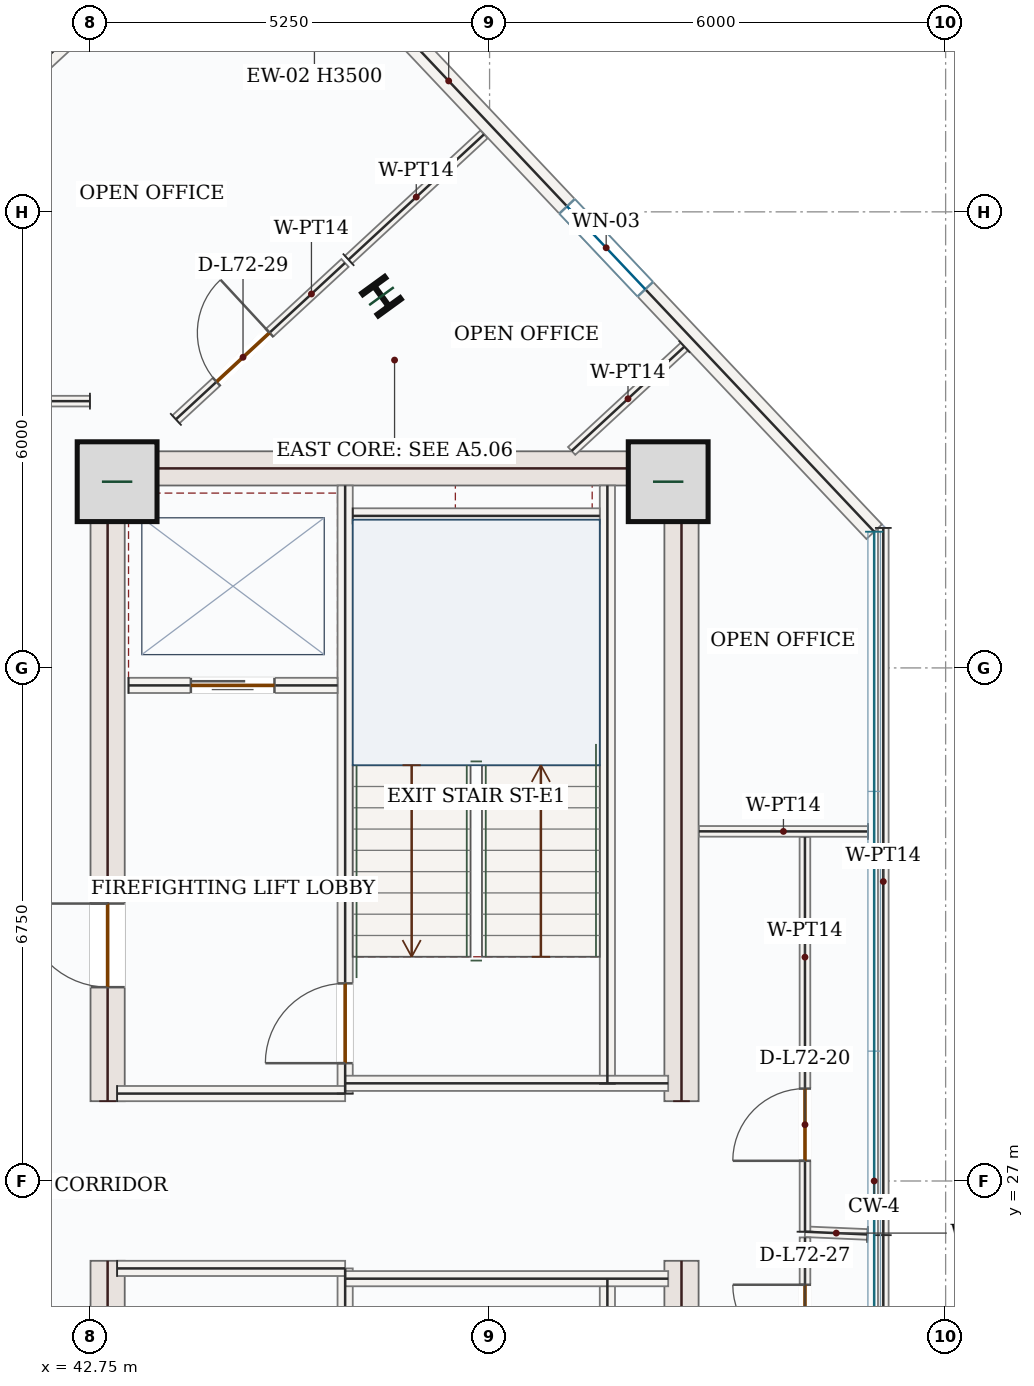
"""IFC4 building model, lengths in metres.
Left out: names, types, materials, properties, quantities, classifications, styles, units other than length and angle.
Written with IfcOpenShell. Run it as: python <this file> out.ifc"""

import sys

from ifc_helpers import new_model, si_unit, direction, frame, frame_2d, origin, origin_2d, place, context, subcontext, project, spatial, rectangle, i_section, extrude, source, transform, mapped, element, fill, save


model = new_model("IFC4")
c1 = context("Model", 3, precision=1e-05, world=origin(), true_north=direction((0.0, 1.0)))
c2 = subcontext(c1, "Body", "Model", "MODEL_VIEW")
j1 = project(units=[si_unit("LENGTHUNIT", "METRE"), si_unit("PLANEANGLEUNIT", "RADIAN")], contexts=[c1])
p1 = place(None, origin())
s1 = spatial("IfcSite", under=j1, at=p1, CompositionType="ELEMENT")
p2 = place(p1, origin())
s2 = spatial("IfcBuilding", under=s1, at=p2, CompositionType="ELEMENT")
p3 = place(p2, frame((0.0, 0.0, 299.1)))
s3 = spatial("IfcBuildingStorey", under=s2, at=p3, CompositionType="ELEMENT", Elevation=299.1)
p4 = place(p3, frame((42.975, 17.4, 0.0), z_axis=(0.0, 0.0, 1.0), x_axis=(0.0, 1.0, 0.0)))
e1 = element("IfcWall", 1, at=p4, inside=s3, PredefinedType="SHEAR", context=c2, shape_type="SweptSolid", body=[
    extrude(rectangle(XDim=8.55, YDim=0.45, at=frame_2d((4.275, 0.0))), origin(), (0.0, 0.0, 1.0), 3.5),
])
p5 = place(p4, frame((6.65, 0.0, 0.0)))
e2 = element("IfcOpeningElement", 2, at=p5, cuts=e1, PredefinedType="OPENING", context=c2, shape_type="SweptSolid", body=[
    extrude(rectangle(XDim=1.1, YDim=2.2, at=frame_2d((0.55, 1.1))), frame((0.0, 0.235, 0.0), z_axis=(0.0, -1.0, 0.0), x_axis=(1.0, 0.0, 0.0)), (0.0, 0.0, 1.0), 0.47),
])
p6 = place(p4, frame((1.75, 0.0, 0.0)))
e3 = element("IfcOpeningElement", 3, at=p6, cuts=e1, PredefinedType="OPENING", context=c2, shape_type="SweptSolid", body=[
    extrude(rectangle(XDim=1.3, YDim=2.2, at=frame_2d((0.65, 1.1))), frame((0.0, 0.235, 0.0), z_axis=(0.0, -1.0, 0.0), x_axis=(1.0, 0.0, 0.0)), (0.0, 0.0, 1.0), 0.47),
])
p7 = place(p4, frame((4.55, 0.0, 0.0)))
e4 = element("IfcOpeningElement", 4, at=p7, cuts=e1, PredefinedType="OPENING", context=c2, shape_type="SweptSolid", body=[
    extrude(rectangle(XDim=0.88, YDim=2.1, at=frame_2d((0.44, 1.05))), frame((0.0, 0.235, 0.0), z_axis=(0.0, -1.0, 0.0), x_axis=(1.0, 0.0, 0.0)), (0.0, 0.0, 1.0), 0.47),
])
p8 = place(p3, frame((42.975, 28.05, 0.0), z_axis=(0.0, 0.0, 1.0), x_axis=(0.0, 1.0, 0.0)))
e5 = element("IfcWall", 5, at=p8, inside=s3, PredefinedType="SHEAR", context=c2, shape_type="SweptSolid", body=[
    extrude(rectangle(XDim=8.55, YDim=0.45, at=frame_2d((4.275, 0.0))), origin(), (0.0, 0.0, 1.0), 3.5),
])
p9 = place(p8, frame((1.5, 0.0, 0.0)))
e6 = element("IfcOpeningElement", 6, at=p9, cuts=e5, PredefinedType="OPENING", context=c2, shape_type="SweptSolid", body=[
    extrude(rectangle(XDim=1.1, YDim=2.2, at=frame_2d((0.55, 1.1))), frame((0.0, 0.235, 0.0), z_axis=(0.0, -1.0, 0.0), x_axis=(1.0, 0.0, 0.0)), (0.0, 0.0, 1.0), 0.47),
])
m1 = source(origin(), c2, "Body", "SweptSolid", [
    extrude(rectangle(XDim=8.55, YDim=0.45, at=frame_2d((4.275, 0.0))), origin(), (0.0, 0.0, 1.0), 3.5),
])
for number, where, z_axis, x_axis in (
    (7, (50.525, 17.4, 0.0), (0.0, 0.0, 1.0), (0.0, 1.0, 0.0)),
    (8, (50.525, 28.05, 0.0), (0.0, 0.0, 1.0), (0.0, 1.0, 0.0)),
):
    element("IfcWall", number, at=place(p3, frame(where, z_axis=z_axis, x_axis=x_axis)), inside=s3, PredefinedType="SHEAR", context=c2, shape_type="MappedRepresentation", body=[
        mapped(m1, transform((0.0, 0.0, 0.0), x_axis=(1.0, 0.0, 0.0), y_axis=(0.0, 1.0, 0.0), z_axis=(0.0, 0.0, 1.0), scale=1.0)),
    ])
m2 = source(origin(), c2, "Body", "SweptSolid", [
    extrude(rectangle(XDim=7.1, YDim=0.45, at=frame_2d((3.55, 0.0))), origin(), (0.0, 0.0, 1.0), 3.5),
])
p10 = place(p3, frame((43.2, 36.375, 0.0), z_axis=(0.0, 0.0, 1.0), x_axis=(1.0, 0.0, 0.0)))
e9 = element("IfcWall", 9, at=p10, inside=s3, PredefinedType="SHEAR", context=c2, shape_type="MappedRepresentation", body=[
    mapped(m2, transform((0.0, 0.0, 0.0), x_axis=(1.0, 0.0, 0.0), y_axis=(0.0, 1.0, 0.0), z_axis=(0.0, 0.0, 1.0), scale=1.0)),
])
m3 = source(origin(), c2, "Body", "SweptSolid", [
    extrude(rectangle(XDim=1.05, YDim=1.05, at=origin_2d()), origin(), (0.0, 0.0, 1.0), 3.75),
])
for number, where, z_axis, x_axis in (
    (10, (43.1, 36.2, 0.0), (0.0, 0.0, 1.0), (1.0, 0.0, 0.0)),
    (11, (50.35, 36.2, 0.0), (0.0, 0.0, 1.0), (1.0, 0.0, 0.0)),
):
    element("IfcColumn", number, at=place(p3, frame(where, z_axis=z_axis, x_axis=x_axis)), inside=s3, PredefinedType="COLUMN", context=c2, shape_type="MappedRepresentation", body=[
        mapped(m3, transform((0.0, 0.0, 0.0), x_axis=(1.0, 0.0, 0.0), y_axis=(0.0, 1.0, 0.0), z_axis=(0.0, 0.0, 1.0), scale=1.0)),
    ])
m4 = source(origin(), c2, "Body", "SweptSolid", [
    extrude(i_section(OverallWidth=0.374, OverallDepth=0.372, WebThickness=0.016, FlangeThickness=0.026, FilletRadius=0.018, at=origin_2d()), origin(), (0.0, 0.0, 1.0), 3.75),
])
p11 = place(p3, frame((46.578, 38.641, 0.0), z_axis=(0.0, 0.0, 1.0), x_axis=(0.809016994375, 0.587785252292, 0.0)))
e12 = element("IfcColumn", 12, at=p11, inside=s3, PredefinedType="COLUMN", context=c2, shape_type="MappedRepresentation", body=[
    mapped(m4, transform((0.0, 0.0, 0.0), x_axis=(1.0, 0.0, 0.0), y_axis=(0.0, 1.0, 0.0), z_axis=(0.0, 0.0, 1.0), scale=1.0)),
])
p12 = place(p3, frame((39.447, 39.26, 0.0), z_axis=(0.0, 0.0, 1.0), x_axis=(0.734109106874, 0.679031530346, 0.0)))
e13 = element("IfcWall", 13, at=p12, inside=s3, PredefinedType="SOLIDWALL", context=c2, shape_type="SweptSolid", body=[
    extrude(rectangle(XDim=5.665, YDim=0.28, at=frame_2d((2.833, 0.0))), origin(), (0.0, 0.0, 1.0), 3.5),
])
p13 = place(p12, frame((2.082, 0.0, 0.85)))
e14 = element("IfcOpeningElement", 14, at=p13, cuts=e13, PredefinedType="OPENING", context=c2, shape_type="SweptSolid", body=[
    extrude(rectangle(XDim=1.5, YDim=1.5, at=frame_2d((0.75, 0.75))), frame((0.0, 0.15, 0.0), z_axis=(0.0, -1.0, 0.0), x_axis=(1.0, 0.0, 0.0)), (0.0, 0.0, 1.0), 0.3),
])
p14 = place(p3, frame((46.008, 43.013, 0.0), z_axis=(0.0, 0.0, 1.0), x_axis=(0.68643580465, -0.727190405667, 0.0)))
e15 = element("IfcWall", 15, at=p14, inside=s3, PredefinedType="SOLIDWALL", context=c2, shape_type="SweptSolid", body=[
    extrude(rectangle(XDim=10.274, YDim=0.28, at=frame_2d((5.137, 0.0))), origin(), (0.0, 0.0, 1.0), 3.5),
])
p15 = place(p14, frame((4.387, 0.0, 0.85)))
e16 = element("IfcOpeningElement", 16, at=p15, cuts=e15, PredefinedType="OPENING", context=c2, shape_type="SweptSolid", body=[
    extrude(rectangle(XDim=1.5, YDim=1.5, at=frame_2d((0.75, 0.75))), frame((0.0, 0.15, 0.0), z_axis=(0.0, -1.0, 0.0), x_axis=(1.0, 0.0, 0.0)), (0.0, 0.0, 1.0), 0.3),
])
m5 = source(origin(), c2, "Body", "SweptSolid", [
    extrude(rectangle(XDim=7.87, YDim=0.2, at=frame_2d((3.935, 0.0))), origin(), (0.0, 0.0, 1.0), 3.5),
])
for number, where, z_axis, x_axis in (
    (17, (49.55, 17.85, 0.0), (0.0, 0.0, 1.0), (0.0, 1.0, 0.0)),
    (18, (49.55, 28.28, 0.0), (0.0, 0.0, 1.0), (0.0, 1.0, 0.0)),
):
    element("IfcWall", number, at=place(p3, frame(where, z_axis=z_axis, x_axis=x_axis)), inside=s3, PredefinedType="SOLIDWALL", context=c2, shape_type="MappedRepresentation", body=[
        mapped(m5, transform((0.0, 0.0, 0.0), x_axis=(1.0, 0.0, 0.0), y_axis=(0.0, 1.0, 0.0), z_axis=(0.0, 0.0, 1.0), scale=1.0)),
    ])
p16 = place(p3, frame((46.1, 17.85, 0.0), z_axis=(0.0, 0.0, 1.0), x_axis=(0.0, 1.0, 0.0)))
e19 = element("IfcWall", 19, at=p16, inside=s3, PredefinedType="SOLIDWALL", context=c2, shape_type="SweptSolid", body=[
    extrude(rectangle(XDim=8.0, YDim=0.2, at=frame_2d((4.0, 0.0))), origin(), (0.0, 0.0, 1.0), 3.5),
])
p17 = place(p16, frame((6.3, 0.0, 0.0)))
e20 = element("IfcOpeningElement", 20, at=p17, cuts=e19, PredefinedType="OPENING", context=c2, shape_type="SweptSolid", body=[
    extrude(rectangle(XDim=1.05, YDim=2.15, at=frame_2d((0.525, 1.075))), frame((0.0, 0.11, 0.0), z_axis=(0.0, -1.0, 0.0), x_axis=(1.0, 0.0, 0.0)), (0.0, 0.0, 1.0), 0.22),
])
p18 = place(p3, frame((46.1, 28.15, 0.0), z_axis=(0.0, 0.0, 1.0), x_axis=(0.0, 1.0, 0.0)))
e21 = element("IfcWall", 21, at=p18, inside=s3, PredefinedType="SOLIDWALL", context=c2, shape_type="SweptSolid", body=[
    extrude(rectangle(XDim=8.0, YDim=0.2, at=frame_2d((4.0, 0.0))), origin(), (0.0, 0.0, 1.0), 3.5),
])
p19 = place(p18, frame((0.4, 0.0, 0.0)))
e22 = element("IfcOpeningElement", 22, at=p19, cuts=e21, PredefinedType="OPENING", context=c2, shape_type="SweptSolid", body=[
    extrude(rectangle(XDim=1.05, YDim=2.15, at=frame_2d((0.525, 1.075))), frame((0.0, 0.11, 0.0), z_axis=(0.0, -1.0, 0.0), x_axis=(1.0, 0.0, 0.0)), (0.0, 0.0, 1.0), 0.22),
])
m6 = source(origin(), c2, "Body", "SweptSolid", [
    extrude(rectangle(XDim=3.0, YDim=0.2, at=frame_2d((1.5, 0.0))), origin(), (0.0, 0.0, 1.0), 3.5),
])
p20 = place(p3, frame((43.1, 25.85, 0.0), z_axis=(0.0, 0.0, 1.0), x_axis=(1.0, 0.0, 0.0)))
e23 = element("IfcWall", 23, at=p20, inside=s3, PredefinedType="SOLIDWALL", context=c2, shape_type="MappedRepresentation", body=[
    mapped(m6, transform((0.0, 0.0, 0.0), x_axis=(1.0, 0.0, 0.0), y_axis=(0.0, 1.0, 0.0), z_axis=(0.0, 0.0, 1.0), scale=1.0)),
])
m7 = source(origin(), c2, "Body", "SweptSolid", [
    extrude(rectangle(XDim=4.25, YDim=0.2, at=frame_2d((2.125, 0.0))), origin(), (0.0, 0.0, 1.0), 3.5),
])
p21 = place(p3, frame((46.1, 25.715, 0.0), z_axis=(0.0, 0.0, 1.0), x_axis=(1.0, 0.0, 0.0)))
e24 = element("IfcWall", 24, at=p21, inside=s3, PredefinedType="SOLIDWALL", context=c2, shape_type="MappedRepresentation", body=[
    mapped(m7, transform((0.0, 0.0, 0.0), x_axis=(1.0, 0.0, 0.0), y_axis=(0.0, 1.0, 0.0), z_axis=(0.0, 0.0, 1.0), scale=1.0)),
])
p22 = place(p3, frame((43.1, 28.15, 0.0), z_axis=(0.0, 0.0, 1.0), x_axis=(1.0, 0.0, 0.0)))
e25 = element("IfcWall", 25, at=p22, inside=s3, PredefinedType="SOLIDWALL", context=c2, shape_type="MappedRepresentation", body=[
    mapped(m6, transform((0.0, 0.0, 0.0), x_axis=(1.0, 0.0, 0.0), y_axis=(0.0, 1.0, 0.0), z_axis=(0.0, 0.0, 1.0), scale=1.0)),
])
p23 = place(p3, frame((46.1, 28.285, 0.0), z_axis=(0.0, 0.0, 1.0), x_axis=(1.0, 0.0, 0.0)))
e26 = element("IfcWall", 26, at=p23, inside=s3, PredefinedType="SOLIDWALL", context=c2, shape_type="MappedRepresentation", body=[
    mapped(m7, transform((0.0, 0.0, 0.0), x_axis=(1.0, 0.0, 0.0), y_axis=(0.0, 1.0, 0.0), z_axis=(0.0, 0.0, 1.0), scale=1.0)),
])
m8 = source(origin(), c2, "Body", "SweptSolid", [
    extrude(rectangle(XDim=3.25, YDim=0.2, at=frame_2d((1.625, 0.0))), origin(), (0.0, 0.0, 1.0), 3.5),
])
p24 = place(p3, frame((46.2, 35.75, 0.0), z_axis=(0.0, 0.0, 1.0), x_axis=(1.0, 0.0, 0.0)))
e27 = element("IfcWall", 27, at=p24, inside=s3, PredefinedType="SOLIDWALL", context=c2, shape_type="MappedRepresentation", body=[
    mapped(m8, transform((0.0, 0.0, 0.0), x_axis=(1.0, 0.0, 0.0), y_axis=(0.0, 1.0, 0.0), z_axis=(0.0, 0.0, 1.0), scale=1.0)),
])
p25 = place(p3, frame((43.25, 33.52, 0.0), z_axis=(0.0, 0.0, 1.0), x_axis=(1.0, 0.0, 0.0)))
e28 = element("IfcWall", 28, at=p25, inside=s3, PredefinedType="SOLIDWALL", context=c2, shape_type="SweptSolid", body=[
    extrude(rectangle(XDim=2.75, YDim=0.2, at=frame_2d((1.375, 0.0))), origin(), (0.0, 0.0, 1.0), 3.5),
])
p26 = place(p25, frame((0.82, 0.0, 0.0)))
e29 = element("IfcOpeningElement", 29, at=p26, cuts=e28, PredefinedType="OPENING", context=c2, shape_type="SweptSolid", body=[
    extrude(rectangle(XDim=1.1, YDim=2.15, at=frame_2d((0.55, 1.075))), frame((0.0, 0.11, 0.0), z_axis=(0.0, -1.0, 0.0), x_axis=(1.0, 0.0, 0.0)), (0.0, 0.0, 1.0), 0.22),
])
p27 = place(p3, frame((43.873, 37.02, 0.0), z_axis=(0.0, 0.0, 1.0), x_axis=(0.734120521476, 0.679019189676, 0.0)))
e30 = element("IfcWall", 30, at=p27, inside=s3, PredefinedType="PARTITIONING", context=c2, shape_type="SweptSolid", body=[
    extrude(rectangle(XDim=3.031, YDim=0.14, at=frame_2d((1.515, 0.0))), origin(), (0.0, 0.0, 1.0), 3.5),
])
p28 = place(p27, frame((0.728, 0.0, 0.0)))
e31 = element("IfcOpeningElement", 31, at=p28, cuts=e30, PredefinedType="OPENING", context=c2, shape_type="SweptSolid", body=[
    extrude(rectangle(XDim=0.95, YDim=2.15, at=frame_2d((0.475, 1.075))), frame((0.0, 0.08, 0.0), z_axis=(0.0, -1.0, 0.0), x_axis=(1.0, 0.0, 0.0)), (0.0, 0.0, 1.0), 0.16),
])
m9 = source(origin(), c2, "Body", "SweptSolid", [
    extrude(rectangle(XDim=2.428, YDim=0.14, at=frame_2d((1.214, 0.0))), origin(), (0.0, 0.0, 1.0), 3.5),
])
p29 = place(p3, frame((46.144, 39.121, 0.0), z_axis=(0.0, 0.0, 1.0), x_axis=(0.734124504125, 0.679014883815, 0.0)))
e32 = element("IfcWall", 32, at=p29, inside=s3, PredefinedType="PARTITIONING", context=c2, shape_type="MappedRepresentation", body=[
    mapped(m9, transform((0.0, 0.0, 0.0), x_axis=(1.0, 0.0, 0.0), y_axis=(0.0, 1.0, 0.0), z_axis=(0.0, 0.0, 1.0), scale=1.0)),
])
m10 = source(origin(), c2, "Body", "SweptSolid", [
    extrude(rectangle(XDim=2.02, YDim=0.14, at=frame_2d((1.01, 0.0))), origin(), (0.0, 0.0, 1.0), 3.5),
])
p30 = place(p3, frame((50.562, 37.977, 0.0), z_axis=(0.0, 0.0, 1.0), x_axis=(-0.734126550915, -0.679012670899, 0.0)))
e33 = element("IfcWall", 33, at=p30, inside=s3, PredefinedType="PARTITIONING", context=c2, shape_type="MappedRepresentation", body=[
    mapped(m10, transform((0.0, 0.0, 0.0), x_axis=(1.0, 0.0, 0.0), y_axis=(0.0, 1.0, 0.0), z_axis=(0.0, 0.0, 1.0), scale=1.0)),
])
m11 = source(origin(), c2, "Body", "SweptSolid", [
    extrude(rectangle(XDim=2.223, YDim=0.14, at=frame_2d((1.111, 0.0))), origin(), (0.0, 0.0, 1.0), 3.5),
])
p31 = place(p3, frame((52.978, 31.598, 0.0), z_axis=(0.0, 0.0, 1.0), x_axis=(-0.999999704402, 0.000768892567, 0.0)))
e34 = element("IfcWall", 34, at=p31, inside=s3, PredefinedType="PARTITIONING", context=c2, shape_type="MappedRepresentation", body=[
    mapped(m11, transform((0.0, 0.0, 0.0), x_axis=(1.0, 0.0, 0.0), y_axis=(0.0, 1.0, 0.0), z_axis=(0.0, 0.0, 1.0), scale=1.0)),
])
m12 = source(origin(), c2, "Body", "SweptSolid", [
    extrude(rectangle(XDim=9.304, YDim=0.14, at=frame_2d((4.652, 0.0))), origin(), (0.0, 0.0, 1.0), 3.5),
])
p32 = place(p3, frame((53.18, 35.592, 0.0), z_axis=(0.0, 0.0, 1.0), x_axis=(0.0, -1.0, 0.0)))
e35 = element("IfcWall", 35, at=p32, inside=s3, PredefinedType="PARTITIONING", context=c2, shape_type="MappedRepresentation", body=[
    mapped(m12, transform((0.0, 0.0, 0.0), x_axis=(1.0, 0.0, 0.0), y_axis=(0.0, 1.0, 0.0), z_axis=(0.0, 0.0, 1.0), scale=1.0)),
])
m13 = source(origin(), c2, "Body", "SweptSolid", [
    extrude(rectangle(XDim=0.823, YDim=0.14, at=frame_2d((0.412, 0.0))), origin(), (0.0, 0.0, 1.0), 3.5),
])
p33 = place(p3, frame((52.972, 26.297, 0.0), z_axis=(0.0, 0.0, 1.0), x_axis=(-0.999049432265, 0.043591649315, 0.0)))
e36 = element("IfcWall", 36, at=p33, inside=s3, PredefinedType="PARTITIONING", context=c2, shape_type="MappedRepresentation", body=[
    mapped(m13, transform((0.0, 0.0, 0.0), x_axis=(1.0, 0.0, 0.0), y_axis=(0.0, 1.0, 0.0), z_axis=(0.0, 0.0, 1.0), scale=1.0)),
])
p34 = place(p3, frame((52.15, 26.333, 0.0), z_axis=(0.0, 0.0, 1.0), x_axis=(-0.000188111359, 0.999999982307, 0.0)))
e37 = element("IfcWall", 37, at=p34, inside=s3, PredefinedType="PARTITIONING", context=c2, shape_type="SweptSolid", body=[
    extrude(rectangle(XDim=5.191, YDim=0.14, at=frame_2d((2.596, 0.0))), origin(), (0.0, 0.0, 1.0), 3.5),
])
p35 = place(p34, frame((0.933, 0.0, 0.0)))
e38 = element("IfcOpeningElement", 38, at=p35, cuts=e37, PredefinedType="OPENING", context=c2, shape_type="SweptSolid", body=[
    extrude(rectangle(XDim=0.95, YDim=2.15, at=frame_2d((0.475, 1.075))), frame((0.0, 0.08, 0.0), z_axis=(0.0, -1.0, 0.0), x_axis=(1.0, 0.0, 0.0)), (0.0, 0.0, 1.0), 0.16),
])
p36 = place(p3, frame((52.149, 22.477, 0.0), z_axis=(0.0, 0.0, 1.0), x_axis=(0.000322913959, 0.999999947863, 0.0)))
e39 = element("IfcWall", 39, at=p36, inside=s3, PredefinedType="PARTITIONING", context=c2, shape_type="SweptSolid", body=[
    extrude(rectangle(XDim=3.78, YDim=0.14, at=frame_2d((1.89, 0.0))), origin(), (0.0, 0.0, 1.0), 3.5),
])
p37 = place(p36, frame((2.208, 0.0, 0.0)))
e40 = element("IfcOpeningElement", 40, at=p37, cuts=e39, PredefinedType="OPENING", context=c2, shape_type="SweptSolid", body=[
    extrude(rectangle(XDim=0.95, YDim=2.15, at=frame_2d((0.475, 1.075))), frame((0.0, 0.08, 0.0), z_axis=(0.0, -1.0, 0.0), x_axis=(1.0, 0.0, 0.0)), (0.0, 0.0, 1.0), 0.16),
])
m14 = source(origin(), c2, "Body", "SweptSolid", [
    extrude(rectangle(XDim=7.879, YDim=0.14, at=frame_2d((3.94, 0.0))), origin(), (0.0, 0.0, 1.0), 3.5),
])
p38 = place(p3, frame((53.18, 26.288, 0.0), z_axis=(0.0, 0.0, 1.0), x_axis=(0.0, -1.0, 0.0)))
e41 = element("IfcWall", 41, at=p38, inside=s3, PredefinedType="PARTITIONING", context=c2, shape_type="MappedRepresentation", body=[
    mapped(m14, transform((0.0, 0.0, 0.0), x_axis=(1.0, 0.0, 0.0), y_axis=(0.0, 1.0, 0.0), z_axis=(0.0, 0.0, 1.0), scale=1.0)),
])
p39 = place(p3, frame((42.742, 37.26, 0.0), z_axis=(0.0, 0.0, 1.0), x_axis=(-0.999999999261, 3.8433452e-05, 0.0)))
e42 = element("IfcWall", 42, at=p39, inside=s3, PredefinedType="PARTITIONING", context=c2, shape_type="SweptSolid", body=[
    extrude(rectangle(XDim=6.352, YDim=0.14, at=frame_2d((3.176, 0.0))), origin(), (0.0, 0.0, 1.0), 3.5),
])
p40 = place(p39, frame((4.214, 0.0, 0.0)))
e43 = element("IfcOpeningElement", 43, at=p40, cuts=e42, PredefinedType="OPENING", context=c2, shape_type="SweptSolid", body=[
    extrude(rectangle(XDim=0.95, YDim=2.15, at=frame_2d((0.475, 1.075))), frame((0.0, 0.08, 0.0), z_axis=(0.0, -1.0, 0.0), x_axis=(1.0, 0.0, 0.0)), (0.0, 0.0, 1.0), 0.16),
])
m15 = source(origin(), c2, "Body", "SweptSolid", [
    extrude(rectangle(XDim=1.5, YDim=1.5, at=frame_2d((0.75, 0.75))), frame((0.0, 0.03, 0.0), z_axis=(0.0, -1.0, 0.0), x_axis=(1.0, 0.0, 0.0)), (0.0, 0.0, 1.0), 0.06),
])
p41 = place(p15, origin())
e44 = element("IfcWindow", 44, at=p41, inside=s3, PartitioningType="SINGLE_PANEL", PredefinedType="WINDOW", context=c2, shape_type="MappedRepresentation", body=[
    mapped(m15, transform((0.0, 0.0, 0.0), x_axis=(1.0, 0.0, 0.0), y_axis=(0.0, 1.0, 0.0), z_axis=(0.0, 0.0, 1.0), scale=1.0)),
])
fill(e16, e44)
m16 = source(origin(), c2, "Body", "SweptSolid", [
    extrude(rectangle(XDim=1.05, YDim=2.15, at=frame_2d((0.525, 1.075))), frame((0.0, 0.025, 0.0), z_axis=(0.0, -1.0, 0.0), x_axis=(1.0, 0.0, 0.0)), (0.0, 0.0, 1.0), 0.05),
])
p42 = place(p19, origin())
e45 = element("IfcDoor", 45, at=p42, inside=s3, OperationType="SINGLE_SWING_LEFT", PredefinedType="DOOR", context=c2, shape_type="MappedRepresentation", body=[
    mapped(m16, transform((0.0, 0.0, 0.0), x_axis=(1.0, 0.0, 0.0), y_axis=(0.0, 1.0, 0.0), z_axis=(0.0, 0.0, 1.0), scale=1.0)),
])
fill(e22, e45)
m17 = source(origin(), c2, "Body", "SweptSolid", [
    extrude(rectangle(XDim=1.1, YDim=2.15, at=frame_2d((0.55, 1.075))), frame((0.0, 0.025, 0.0), z_axis=(0.0, -1.0, 0.0), x_axis=(1.0, 0.0, 0.0)), (0.0, 0.0, 1.0), 0.05),
])
p43 = place(p26, origin())
e46 = element("IfcDoor", 46, at=p43, inside=s3, OperationType="DOUBLE_DOOR_SLIDING", PredefinedType="DOOR", context=c2, shape_type="MappedRepresentation", body=[
    mapped(m17, transform((0.0, 0.0, 0.0), x_axis=(1.0, 0.0, 0.0), y_axis=(0.0, 1.0, 0.0), z_axis=(0.0, 0.0, 1.0), scale=1.0)),
])
fill(e29, e46)
m18 = source(origin(), c2, "Body", "SweptSolid", [
    extrude(rectangle(XDim=1.1, YDim=2.2, at=frame_2d((0.55, 1.1))), frame((0.0, 0.025, 0.0), z_axis=(0.0, -1.0, 0.0), x_axis=(1.0, 0.0, 0.0)), (0.0, 0.0, 1.0), 0.05),
])
p44 = place(p9, origin())
e47 = element("IfcDoor", 47, at=p44, inside=s3, OperationType="SINGLE_SWING_RIGHT", PredefinedType="DOOR", context=c2, shape_type="MappedRepresentation", body=[
    mapped(m18, transform((0.0, 0.0, 0.0), x_axis=(1.0, 0.0, 0.0), y_axis=(0.0, 1.0, 0.0), z_axis=(0.0, 0.0, 1.0), scale=1.0)),
])
fill(e6, e47)
m19 = source(origin(), c2, "Body", "SweptSolid", [
    extrude(rectangle(XDim=0.95, YDim=2.15, at=frame_2d((0.475, 1.075))), frame((0.0, 0.025, 0.0), z_axis=(0.0, -1.0, 0.0), x_axis=(1.0, 0.0, 0.0)), (0.0, 0.0, 1.0), 0.05),
])
p45 = place(p35, origin())
e48 = element("IfcDoor", 48, at=p45, inside=s3, OperationType="SINGLE_SWING_LEFT", PredefinedType="DOOR", context=c2, shape_type="MappedRepresentation", body=[
    mapped(m19, transform((0.0, 0.0, 0.0), x_axis=(1.0, 0.0, 0.0), y_axis=(0.0, 1.0, 0.0), z_axis=(0.0, 0.0, 1.0), scale=1.0)),
])
fill(e38, e48)
p46 = place(p37, origin())
e49 = element("IfcDoor", 49, at=p46, inside=s3, OperationType="SINGLE_SWING_RIGHT", PredefinedType="DOOR", context=c2, shape_type="MappedRepresentation", body=[
    mapped(m19, transform((0.0, 0.0, 0.0), x_axis=(1.0, 0.0, 0.0), y_axis=(0.0, 1.0, 0.0), z_axis=(0.0, 0.0, 1.0), scale=1.0)),
])
fill(e40, e49)
p47 = place(p28, origin())
e50 = element("IfcDoor", 50, at=p47, inside=s3, OperationType="SINGLE_SWING_RIGHT", PredefinedType="DOOR", context=c2, shape_type="MappedRepresentation", body=[
    mapped(m19, transform((0.0, 0.0, 0.0), x_axis=(1.0, 0.0, 0.0), y_axis=(0.0, 1.0, 0.0), z_axis=(0.0, 0.0, 1.0), scale=1.0)),
])
fill(e31, e50)
save(model, sys.argv[1])
